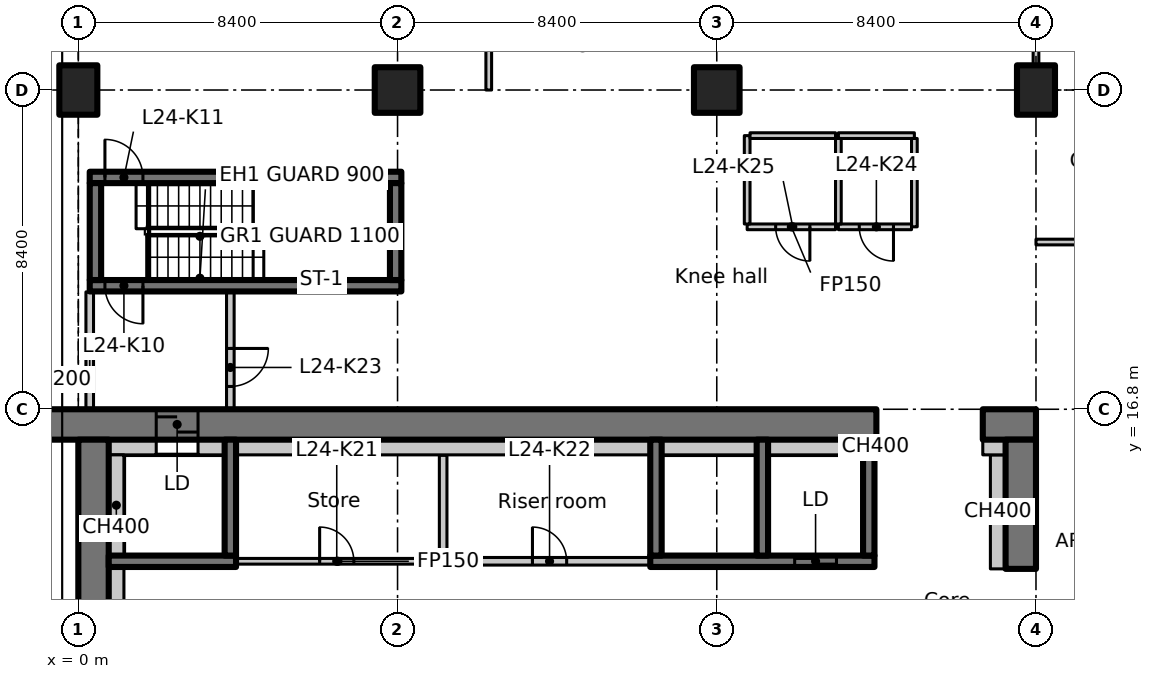
"""IFC4 building model, lengths in metres.
Left out: names, types, materials, properties, quantities, classifications, styles, units other than length and angle.
Written with IfcOpenShell. Run it as: python <this file> out.ifc"""

import sys

from ifc_helpers import new_model, si_unit, direction, frame, frame_2d, origin, origin_2d, place, context, subcontext, project, spatial, polyline, rectangle, outline, extrude, element, fill, save


model = new_model("IFC4")
c1 = context("Model", 3, precision=1e-05, world=origin(), true_north=direction((0.0, 1.0)))
c2 = subcontext(c1, "Body", "Model", "MODEL_VIEW")
j1 = project(units=[si_unit("LENGTHUNIT", "METRE"), si_unit("PLANEANGLEUNIT", "RADIAN")], contexts=[c1])
p1 = place(None, origin())
s1 = spatial("IfcSite", under=j1, at=p1, CompositionType="ELEMENT")
p2 = place(p1, origin())
s2 = spatial("IfcBuilding", under=s1, at=p2, CompositionType="ELEMENT")
p3 = place(p2, frame((0.0, 0.0, 102.5)))
s3 = spatial("IfcBuildingStorey", under=s2, at=p3, CompositionType="ELEMENT", Elevation=102.5)
p4 = place(p3, frame((0.0, 25.2, 0.0), z_axis=(0.0, 0.0, 1.0), x_axis=(1.0, 0.0, 0.0)))
e1 = element("IfcColumn", 1, at=p4, inside=s3, PredefinedType="COLUMN", context=c2, shape_type="SweptSolid", body=[
    extrude(rectangle(XDim=1.0, YDim=1.3, at=origin_2d()), origin(), (0.0, 0.0, 1.0), 3.35),
])
for number, where, z_axis, x_axis in (
    (2, (8.4, 25.2, 0.0), (0.0, 0.0, 1.0), (1.0, 0.0, 0.0)),
    (3, (16.8, 25.2, 0.0), (0.0, 0.0, 1.0), (1.0, 0.0, 0.0)),
):
    element("IfcColumn", number, at=place(p3, frame(where, z_axis=z_axis, x_axis=x_axis)), inside=s3, PredefinedType="COLUMN", context=c2, shape_type="SweptSolid", body=[
        extrude(rectangle(XDim=1.2, YDim=1.2, at=origin_2d()), origin(), (0.0, 0.0, 1.0), 3.35),
    ])
p5 = place(p3, frame((25.2, 25.2, 0.0), z_axis=(0.0, 0.0, 1.0), x_axis=(1.0, 0.0, 0.0)))
e4 = element("IfcColumn", 4, at=p5, inside=s3, PredefinedType="COLUMN", context=c2, shape_type="SweptSolid", body=[
    extrude(rectangle(XDim=1.0, YDim=1.3, at=origin_2d()), origin(), (0.0, 0.0, 1.0), 3.35),
])
p6 = place(p3, frame((-1.1, 16.4, 0.0), z_axis=(0.0, 0.0, 1.0), x_axis=(1.0, 0.0, 0.0)))
e5 = element("IfcWall", 5, at=p6, inside=s3, PredefinedType="SHEAR", context=c2, shape_type="SweptSolid", body=[
    extrude(rectangle(XDim=22.1, YDim=0.8, at=frame_2d((11.05, 0.0))), origin(), (0.0, 0.0, 1.0), 3.35),
])
p7 = place(p6, frame((3.15, 0.0, 0.0)))
e6 = element("IfcOpeningElement", 6, at=p7, cuts=e5, PredefinedType="OPENING", context=c2, shape_type="SweptSolid", body=[
    extrude(rectangle(XDim=1.1, YDim=2.3, at=frame_2d((0.55, 1.15))), frame((0.0, 0.41, 0.0), z_axis=(0.0, -1.0, 0.0), x_axis=(1.0, 0.0, 0.0)), (0.0, 0.0, 1.0), 0.82),
])
p8 = place(p3, frame((23.8, 16.4, 0.0), z_axis=(0.0, 0.0, 1.0), x_axis=(1.0, 0.0, 0.0)))
e7 = element("IfcWall", 7, at=p8, inside=s3, PredefinedType="SHEAR", context=c2, shape_type="SweptSolid", body=[
    extrude(rectangle(XDim=1.4, YDim=0.8, at=frame_2d((0.7, 0.0))), origin(), (0.0, 0.0, 1.0), 3.35),
])
p9 = place(p3, frame((0.4, 7.136, 0.0), z_axis=(0.0, 0.0, 1.0), x_axis=(0.0, 1.0, 0.0)))
e8 = element("IfcWall", 8, at=p9, inside=s3, PredefinedType="SHEAR", context=c2, shape_type="SweptSolid", body=[
    extrude(rectangle(XDim=8.864, YDim=0.8, at=frame_2d((4.432, 0.0))), origin(), (0.0, 0.0, 1.0), 3.35),
])
p10 = place(p3, frame((24.8, 12.6, 0.0), z_axis=(0.0, 0.0, 1.0), x_axis=(0.0, 1.0, 0.0)))
e9 = element("IfcWall", 9, at=p10, inside=s3, PredefinedType="SHEAR", context=c2, shape_type="SweptSolid", body=[
    extrude(rectangle(XDim=3.4, YDim=0.8, at=frame_2d((1.7, 0.0))), origin(), (0.0, 0.0, 1.0), 3.35),
])
p11 = place(p3, frame((24.2, 12.6, 0.0), z_axis=(0.0, 0.0, 1.0), x_axis=(0.0, 1.0, 0.0)))
e10 = element("IfcWall", 10, at=p11, inside=s3, PredefinedType="PARTITIONING", context=c2, shape_type="SweptSolid", body=[
    extrude(rectangle(XDim=3.0, YDim=0.4, at=frame_2d((1.5, 0.0))), origin(), (0.0, 0.0, 1.0), 3.35),
])
p12 = place(p3, frame((0.8, 15.8, 0.0), z_axis=(0.0, 0.0, 1.0), x_axis=(1.0, 0.0, 0.0)))
e11 = element("IfcWall", 11, at=p12, inside=s3, PredefinedType="PARTITIONING", context=c2, shape_type="SweptSolid", body=[
    extrude(rectangle(XDim=1.25, YDim=0.4, at=frame_2d((0.625, 0.0))), origin(), (0.0, 0.0, 1.0), 3.35),
])
p13 = place(p3, frame((23.8, 15.8, 0.0), z_axis=(0.0, 0.0, 1.0), x_axis=(1.0, 0.0, 0.0)))
e12 = element("IfcWall", 12, at=p13, inside=s3, PredefinedType="PARTITIONING", context=c2, shape_type="SweptSolid", body=[
    extrude(rectangle(XDim=0.6, YDim=0.4, at=frame_2d((0.3, 0.0))), origin(), (0.0, 0.0, 1.0), 3.35),
])
p14 = place(p3, frame((0.8, 12.8, 0.0), z_axis=(0.0, 0.0, 1.0), x_axis=(1.0, 0.0, 0.0)))
e13 = element("IfcWall", 13, at=p14, inside=s3, PredefinedType="SHEAR", context=c2, shape_type="SweptSolid", body=[
    extrude(rectangle(XDim=3.35, YDim=0.3, at=frame_2d((1.675, 0.0))), origin(), (0.0, 0.0, 1.0), 3.35),
])
p15 = place(p3, frame((4.0, 12.95, 0.0), z_axis=(0.0, 0.0, 1.0), x_axis=(0.0, 1.0, 0.0)))
e14 = element("IfcWall", 14, at=p15, inside=s3, PredefinedType="SHEAR", context=c2, shape_type="SweptSolid", body=[
    extrude(rectangle(XDim=3.05, YDim=0.3, at=frame_2d((1.525, 0.0))), origin(), (0.0, 0.0, 1.0), 3.35),
])
p16 = place(p3, frame((15.05, 12.8, 0.0), z_axis=(0.0, 0.0, 1.0), x_axis=(1.0, 0.0, 0.0)))
e15 = element("IfcWall", 15, at=p16, inside=s3, PredefinedType="SHEAR", context=c2, shape_type="SweptSolid", body=[
    extrude(rectangle(XDim=5.9, YDim=0.3, at=frame_2d((2.95, 0.0))), origin(), (0.0, 0.0, 1.0), 3.35),
])
p17 = place(p16, frame((3.8, 0.0, 0.0)))
e16 = element("IfcOpeningElement", 16, at=p17, cuts=e15, PredefinedType="OPENING", context=c2, shape_type="SweptSolid", body=[
    extrude(rectangle(XDim=1.1, YDim=2.3, at=frame_2d((0.55, 1.15))), frame((0.0, 0.16, 0.0), z_axis=(0.0, -1.0, 0.0), x_axis=(1.0, 0.0, 0.0)), (0.0, 0.0, 1.0), 0.32),
])
for number, where, z_axis, x_axis in (
    (17, (15.2, 12.95, 0.0), (0.0, 0.0, 1.0), (0.0, 1.0, 0.0)),
    (18, (18.0, 12.95, 0.0), (0.0, 0.0, 1.0), (0.0, 1.0, 0.0)),
    (19, (20.8, 12.95, 0.0), (0.0, 0.0, 1.0), (0.0, 1.0, 0.0)),
):
    element("IfcWall", number, at=place(p3, frame(where, z_axis=z_axis, x_axis=x_axis)), inside=s3, PredefinedType="SHEAR", context=c2, shape_type="SweptSolid", body=[
        extrude(rectangle(XDim=3.05, YDim=0.3, at=frame_2d((1.525, 0.0))), origin(), (0.0, 0.0, 1.0), 3.35),
    ])
p18 = place(p3, frame((8.5, 20.05, 0.0), z_axis=(0.0, 0.0, 1.0), x_axis=(-1.0, 0.0, 0.0)))
e20 = element("IfcWall", 20, at=p18, inside=s3, PredefinedType="SHEAR", context=c2, shape_type="SweptSolid", body=[
    extrude(rectangle(XDim=8.2, YDim=0.3, at=frame_2d((4.1, 0.0))), origin(), (0.0, 0.0, 1.0), 3.35),
])
p19 = place(p18, frame((6.8, 0.0, 0.0)))
e21 = element("IfcOpeningElement", 21, at=p19, cuts=e20, PredefinedType="OPENING", context=c2, shape_type="SweptSolid", body=[
    extrude(rectangle(XDim=1.0, YDim=2.1, at=frame_2d((0.5, 1.05))), frame((0.0, 0.16, 0.0), z_axis=(0.0, -1.0, 0.0), x_axis=(1.0, 0.0, 0.0)), (0.0, 0.0, 1.0), 0.32),
])
p20 = place(p3, frame((0.3, 22.9, 0.0), z_axis=(0.0, 0.0, 1.0), x_axis=(1.0, 0.0, 0.0)))
e22 = element("IfcWall", 22, at=p20, inside=s3, PredefinedType="SHEAR", context=c2, shape_type="SweptSolid", body=[
    extrude(rectangle(XDim=8.2, YDim=0.3, at=frame_2d((4.1, 0.0))), origin(), (0.0, 0.0, 1.0), 3.35),
])
p21 = place(p20, frame((0.4, 0.0, 0.0)))
e23 = element("IfcOpeningElement", 23, at=p21, cuts=e22, PredefinedType="OPENING", context=c2, shape_type="SweptSolid", body=[
    extrude(rectangle(XDim=1.0, YDim=2.1, at=frame_2d((0.5, 1.05))), frame((0.0, 0.16, 0.0), z_axis=(0.0, -1.0, 0.0), x_axis=(1.0, 0.0, 0.0)), (0.0, 0.0, 1.0), 0.32),
])
for number, where, z_axis, x_axis in (
    (24, (0.45, 20.2, 0.0), (0.0, 0.0, 1.0), (0.0, 1.0, 0.0)),
    (25, (8.35, 20.2, 0.0), (0.0, 0.0, 1.0), (0.0, 1.0, 0.0)),
):
    element("IfcWall", number, at=place(p3, frame(where, z_axis=z_axis, x_axis=x_axis)), inside=s3, PredefinedType="SHEAR", context=c2, shape_type="SweptSolid", body=[
        extrude(rectangle(XDim=2.55, YDim=0.3, at=frame_2d((1.275, 0.0))), origin(), (0.0, 0.0, 1.0), 3.35),
    ])
p22 = place(p3, frame((0.3, 16.812, 0.0), z_axis=(0.0, 0.0, 1.0), x_axis=(0.0, 1.0, 0.0)))
e26 = element("IfcWall", 26, at=p22, inside=s3, PredefinedType="PARTITIONING", context=c2, shape_type="SweptSolid", body=[
    extrude(rectangle(XDim=3.076, YDim=0.2, at=frame_2d((1.538, 0.0))), origin(), (0.0, 0.0, 1.0), 2.98),
])
p23 = place(p3, frame((4.0, 19.888, 0.0), z_axis=(0.0, 0.0, 1.0), x_axis=(0.0, -1.0, 0.0)))
e27 = element("IfcWall", 27, at=p23, inside=s3, PredefinedType="PARTITIONING", context=c2, shape_type="SweptSolid", body=[
    extrude(rectangle(XDim=3.076, YDim=0.2, at=frame_2d((1.538, 0.0))), origin(), (0.0, 0.0, 1.0), 3.35),
])
p24 = place(p23, frame((1.488, 0.0, 0.0)))
e28 = element("IfcOpeningElement", 28, at=p24, cuts=e27, PredefinedType="OPENING", context=c2, shape_type="SweptSolid", body=[
    extrude(rectangle(XDim=1.0, YDim=2.1, at=frame_2d((0.5, 1.05))), frame((0.0, 0.11, 0.0), z_axis=(0.0, -1.0, 0.0), x_axis=(1.0, 0.0, 0.0)), (0.0, 0.0, 1.0), 0.22),
])
p25 = place(p3, frame((9.6, 15.588, 0.0), z_axis=(0.0, 0.0, 1.0), x_axis=(0.0, -1.0, 0.0)))
e29 = element("IfcWall", 29, at=p25, inside=s3, PredefinedType="PARTITIONING", context=c2, shape_type="SweptSolid", body=[
    extrude(rectangle(XDim=2.788, YDim=0.2, at=frame_2d((1.394, 0.0))), origin(), (0.0, 0.0, 1.0), 3.35),
])
p26 = place(p3, frame((9.7, 12.8, 0.0), z_axis=(0.0, 0.0, 1.0), x_axis=(1.0, 0.0, 0.0)))
e30 = element("IfcWall", 30, at=p26, inside=s3, PredefinedType="PARTITIONING", context=c2, shape_type="SweptSolid", body=[
    extrude(rectangle(XDim=5.338, YDim=0.2, at=frame_2d((2.669, 0.0))), origin(), (0.0, 0.0, 1.0), 3.35),
])
p27 = place(p26, frame((2.25, 0.0, 0.0)))
e31 = element("IfcOpeningElement", 31, at=p27, cuts=e30, PredefinedType="OPENING", context=c2, shape_type="SweptSolid", body=[
    extrude(rectangle(XDim=0.9, YDim=2.1, at=frame_2d((0.45, 1.05))), frame((0.0, 0.11, 0.0), z_axis=(0.0, -1.0, 0.0), x_axis=(1.0, 0.0, 0.0)), (0.0, 0.0, 1.0), 0.22),
])
p28 = place(p3, frame((4.162, 12.8, 0.0), z_axis=(0.0, 0.0, 1.0), x_axis=(1.0, 0.0, 0.0)))
e32 = element("IfcWall", 32, at=p28, inside=s3, PredefinedType="PARTITIONING", context=c2, shape_type="SweptSolid", body=[
    extrude(rectangle(XDim=5.338, YDim=0.15, at=frame_2d((2.669, 0.0))), origin(), (0.0, 0.0, 1.0), 3.35),
])
p29 = place(p28, frame((2.188, 0.0, 0.0)))
e33 = element("IfcOpeningElement", 33, at=p29, cuts=e32, PredefinedType="OPENING", context=c2, shape_type="SweptSolid", body=[
    extrude(rectangle(XDim=0.9, YDim=2.1, at=frame_2d((0.45, 1.05))), frame((0.0, 0.085, 0.0), z_axis=(0.0, -1.0, 0.0), x_axis=(1.0, 0.0, 0.0)), (0.0, 0.0, 1.0), 0.17),
])
p30 = place(p3, frame((20.0, 24.0, 0.0), z_axis=(0.0, 0.0, 1.0), x_axis=(1.0, 0.0, 0.0)))
e34 = element("IfcWall", 34, at=p30, inside=s3, PredefinedType="PARTITIONING", context=c2, shape_type="SweptSolid", body=[
    extrude(rectangle(XDim=2.0, YDim=0.15, at=frame_2d((1.0, 0.0))), origin(), (0.0, 0.0, 1.0), 3.35),
])
p31 = place(p3, frame((22.0, 23.925, 0.0), z_axis=(0.0, 0.0, 1.0), x_axis=(0.0, -1.0, 0.0)))
e35 = element("IfcWall", 35, at=p31, inside=s3, PredefinedType="PARTITIONING", context=c2, shape_type="SweptSolid", body=[
    extrude(rectangle(XDim=2.325, YDim=0.15, at=frame_2d((1.163, 0.0))), origin(), (0.0, 0.0, 1.0), 3.35),
])
p32 = place(p3, frame((21.925, 21.6, 0.0), z_axis=(0.0, 0.0, 1.0), x_axis=(-1.0, 0.0, 0.0)))
e36 = element("IfcWall", 36, at=p32, inside=s3, PredefinedType="PARTITIONING", context=c2, shape_type="SweptSolid", body=[
    extrude(rectangle(XDim=1.925, YDim=0.15, at=frame_2d((0.962, 0.0))), origin(), (0.0, 0.0, 1.0), 3.35),
])
p33 = place(p32, frame((0.475, 0.0, 0.0)))
e37 = element("IfcOpeningElement", 37, at=p33, cuts=e36, PredefinedType="OPENING", context=c2, shape_type="SweptSolid", body=[
    extrude(rectangle(XDim=0.9, YDim=2.1, at=frame_2d((0.45, 1.05))), frame((0.0, 0.085, 0.0), z_axis=(0.0, -1.0, 0.0), x_axis=(1.0, 0.0, 0.0)), (0.0, 0.0, 1.0), 0.17),
])
p34 = place(p3, frame((20.0, 21.675, 0.0), z_axis=(0.0, 0.0, 1.0), x_axis=(0.0, 1.0, 0.0)))
e38 = element("IfcWall", 38, at=p34, inside=s3, PredefinedType="PARTITIONING", context=c2, shape_type="SweptSolid", body=[
    extrude(rectangle(XDim=2.25, YDim=0.15, at=frame_2d((1.125, 0.0))), origin(), (0.0, 0.0, 1.0), 3.35),
])
p35 = place(p3, frame((19.925, 21.6, 0.0), z_axis=(0.0, 0.0, 1.0), x_axis=(-1.0, 0.0, 0.0)))
e39 = element("IfcWall", 39, at=p35, inside=s3, PredefinedType="PARTITIONING", context=c2, shape_type="SweptSolid", body=[
    extrude(rectangle(XDim=2.325, YDim=0.15, at=frame_2d((1.163, 0.0))), origin(), (0.0, 0.0, 1.0), 3.35),
])
p36 = place(p35, frame((0.675, 0.0, 0.0)))
e40 = element("IfcOpeningElement", 40, at=p36, cuts=e39, PredefinedType="OPENING", context=c2, shape_type="SweptSolid", body=[
    extrude(rectangle(XDim=0.9, YDim=2.1, at=frame_2d((0.45, 1.05))), frame((0.0, 0.085, 0.0), z_axis=(0.0, -1.0, 0.0), x_axis=(1.0, 0.0, 0.0)), (0.0, 0.0, 1.0), 0.17),
])
p37 = place(p3, frame((17.6, 21.675, 0.0), z_axis=(0.0, 0.0, 1.0), x_axis=(0.0, 1.0, 0.0)))
e41 = element("IfcWall", 41, at=p37, inside=s3, PredefinedType="PARTITIONING", context=c2, shape_type="SweptSolid", body=[
    extrude(rectangle(XDim=2.325, YDim=0.15, at=frame_2d((1.163, 0.0))), origin(), (0.0, 0.0, 1.0), 3.35),
])
p38 = place(p3, frame((17.675, 24.0, 0.0), z_axis=(0.0, 0.0, 1.0), x_axis=(1.0, 0.0, 0.0)))
e42 = element("IfcWall", 42, at=p38, inside=s3, PredefinedType="PARTITIONING", context=c2, shape_type="SweptSolid", body=[
    extrude(rectangle(XDim=2.25, YDim=0.15, at=frame_2d((1.125, 0.0))), origin(), (0.0, 0.0, 1.0), 3.35),
])
p39 = place(p3, frame((1.0, 9.75, 0.0), z_axis=(0.0, 0.0, 1.0), x_axis=(0.0, 1.0, 0.0)))
e43 = element("IfcWall", 43, at=p39, inside=s3, PredefinedType="PARTITIONING", context=c2, shape_type="SweptSolid", body=[
    extrude(rectangle(XDim=2.9, YDim=0.4, at=frame_2d((1.45, 0.0))), origin(), (0.0, 0.0, 1.0), 3.35),
])
p40 = place(p3, frame((1.0, 12.95, 0.0), z_axis=(0.0, 0.0, 1.0), x_axis=(0.0, 1.0, 0.0)))
e44 = element("IfcWall", 44, at=p40, inside=s3, PredefinedType="PARTITIONING", context=c2, shape_type="SweptSolid", body=[
    extrude(rectangle(XDim=2.65, YDim=0.4, at=frame_2d((1.325, 0.0))), origin(), (0.0, 0.0, 1.0), 3.35),
])
p41 = place(p3, frame((3.15, 15.8, 0.0), z_axis=(0.0, 0.0, 1.0), x_axis=(1.0, 0.0, 0.0)))
e45 = element("IfcWall", 45, at=p41, inside=s3, PredefinedType="PARTITIONING", context=c2, shape_type="SweptSolid", body=[
    extrude(rectangle(XDim=0.7, YDim=0.4, at=frame_2d((0.35, 0.0))), origin(), (0.0, 0.0, 1.0), 3.35),
])
p42 = place(p3, frame((4.15, 15.8, 0.0), z_axis=(0.0, 0.0, 1.0), x_axis=(1.0, 0.0, 0.0)))
e46 = element("IfcWall", 46, at=p42, inside=s3, PredefinedType="PARTITIONING", context=c2, shape_type="SweptSolid", body=[
    extrude(rectangle(XDim=10.9, YDim=0.4, at=frame_2d((5.45, 0.0))), origin(), (0.0, 0.0, 1.0), 3.35),
])
for number, where, z_axis, x_axis in (
    (47, (15.35, 15.8, 0.0), (0.0, 0.0, 1.0), (1.0, 0.0, 0.0)),
    (48, (18.15, 15.8, 0.0), (0.0, 0.0, 1.0), (1.0, 0.0, 0.0)),
):
    element("IfcWall", number, at=place(p3, frame(where, z_axis=z_axis, x_axis=x_axis)), inside=s3, PredefinedType="PARTITIONING", context=c2, shape_type="SweptSolid", body=[
        extrude(rectangle(XDim=2.5, YDim=0.4, at=frame_2d((1.25, 0.0))), origin(), (0.0, 0.0, 1.0), 3.35),
    ])
p43 = place(p3, frame((20.95, 15.8, 0.0), z_axis=(0.0, 0.0, 1.0), x_axis=(1.0, 0.0, 0.0)))
e49 = element("IfcWall", 49, at=p43, inside=s3, PredefinedType="PARTITIONING", context=c2, shape_type="SweptSolid", body=[
    extrude(rectangle(XDim=0.05, YDim=0.4, at=frame_2d((0.025, 0.0))), origin(), (0.0, 0.0, 1.0), 3.35),
])
p44 = place(p3, frame((25.2, 21.2, 0.0), z_axis=(0.0, 0.0, 1.0), x_axis=(1.0, 0.0, 0.0)))
e50 = element("IfcWall", 50, at=p44, inside=s3, PredefinedType="PARTITIONING", context=c2, shape_type="SweptSolid", body=[
    extrude(rectangle(XDim=4.2, YDim=0.15, at=frame_2d((2.1, 0.0))), origin(), (0.0, 0.0, 1.0), 3.33),
])
p45 = place(p3, frame((25.2, 31.0, 0.0), z_axis=(0.0, 0.0, 1.0), x_axis=(0.0, -1.0, 0.0)))
e51 = element("IfcWall", 51, at=p45, inside=s3, PredefinedType="PARTITIONING", context=c2, shape_type="SweptSolid", body=[
    extrude(outline(polyline([(0.0, 0.0), (5.13, 0.0), (5.13, 2.98), (0.0, 2.98), (0.0, 0.0)])), frame((0.0, 0.075, 0.0), z_axis=(0.0, -1.0, 0.0), x_axis=(1.0, 0.0, 0.0)), (0.0, 0.0, 1.0), 0.15),
])
p46 = place(p45, frame((1.93, 0.0, 0.0)))
e52 = element("IfcOpeningElement", 52, at=p46, cuts=e51, PredefinedType="OPENING", context=c2, shape_type="SweptSolid", body=[
    extrude(rectangle(XDim=1.1, YDim=2.1, at=frame_2d((0.55, 1.05))), frame((0.0, 0.085, 0.0), z_axis=(0.0, -1.0, 0.0), x_axis=(1.0, 0.0, 0.0)), (0.0, 0.0, 1.0), 0.17),
])
p47 = place(p3, frame((10.8, 25.2, 0.0), z_axis=(0.0, 0.0, 1.0), x_axis=(0.0, 1.0, 0.0)))
e53 = element("IfcWall", 53, at=p47, inside=s3, PredefinedType="PARTITIONING", context=c2, shape_type="SweptSolid", body=[
    extrude(rectangle(XDim=8.4, YDim=0.15, at=frame_2d((4.2, 0.0))), origin(), (0.0, 0.0, 1.0), 3.33),
])
p48 = place(p47, frame((3.3, 0.0, 0.0)))
e54 = element("IfcOpeningElement", 54, at=p48, cuts=e53, PredefinedType="OPENING", context=c2, shape_type="SweptSolid", body=[
    extrude(rectangle(XDim=1.6, YDim=2.1, at=frame_2d((0.8, 1.05))), frame((0.0, 0.085, 0.0), z_axis=(0.0, -1.0, 0.0), x_axis=(1.0, 0.0, 0.0)), (0.0, 0.0, 1.0), 0.17),
])
p49 = place(p7, origin())
e55 = element("IfcDoor", 55, at=p49, inside=s3, OperationType="SLIDING_TO_LEFT", PredefinedType="DOOR", context=c2, shape_type="SweptSolid", body=[
    extrude(rectangle(XDim=1.1, YDim=2.3, at=frame_2d((0.55, 1.15))), frame((0.0, 0.025, 0.0), z_axis=(0.0, -1.0, 0.0), x_axis=(1.0, 0.0, 0.0)), (0.0, 0.0, 1.0), 0.05),
])
fill(e6, e55)
p50 = place(p17, origin())
e56 = element("IfcDoor", 56, at=p50, inside=s3, OperationType="SLIDING_TO_LEFT", PredefinedType="DOOR", context=c2, shape_type="SweptSolid", body=[
    extrude(rectangle(XDim=1.1, YDim=2.3, at=frame_2d((0.55, 1.15))), frame((0.0, 0.025, 0.0), z_axis=(0.0, -1.0, 0.0), x_axis=(1.0, 0.0, 0.0)), (0.0, 0.0, 1.0), 0.05),
])
fill(e16, e56)
p51 = place(p19, origin())
e57 = element("IfcDoor", 57, at=p51, inside=s3, OperationType="SINGLE_SWING_RIGHT", PredefinedType="DOOR", context=c2, shape_type="SweptSolid", body=[
    extrude(rectangle(XDim=1.0, YDim=2.1, at=frame_2d((0.5, 1.05))), frame((0.0, 0.025, 0.0), z_axis=(0.0, -1.0, 0.0), x_axis=(1.0, 0.0, 0.0)), (0.0, 0.0, 1.0), 0.05),
])
fill(e21, e57)
p52 = place(p21, origin())
e58 = element("IfcDoor", 58, at=p52, inside=s3, OperationType="SINGLE_SWING_LEFT", PredefinedType="DOOR", context=c2, shape_type="SweptSolid", body=[
    extrude(rectangle(XDim=1.0, YDim=2.1, at=frame_2d((0.5, 1.05))), frame((0.0, 0.025, 0.0), z_axis=(0.0, -1.0, 0.0), x_axis=(1.0, 0.0, 0.0)), (0.0, 0.0, 1.0), 0.05),
])
fill(e23, e58)
p53 = place(p29, origin())
e59 = element("IfcDoor", 59, at=p53, inside=s3, OperationType="SINGLE_SWING_LEFT", PredefinedType="DOOR", context=c2, shape_type="SweptSolid", body=[
    extrude(rectangle(XDim=0.9, YDim=2.1, at=frame_2d((0.45, 1.05))), frame((0.0, 0.025, 0.0), z_axis=(0.0, -1.0, 0.0), x_axis=(1.0, 0.0, 0.0)), (0.0, 0.0, 1.0), 0.05),
])
fill(e33, e59)
p54 = place(p27, origin())
e60 = element("IfcDoor", 60, at=p54, inside=s3, OperationType="SINGLE_SWING_RIGHT", PredefinedType="DOOR", context=c2, shape_type="SweptSolid", body=[
    extrude(rectangle(XDim=0.9, YDim=2.1, at=frame_2d((0.45, 1.05))), frame((0.0, 0.025, 0.0), z_axis=(0.0, -1.0, 0.0), x_axis=(1.0, 0.0, 0.0)), (0.0, 0.0, 1.0), 0.05),
])
fill(e31, e60)
p55 = place(p24, origin())
e61 = element("IfcDoor", 61, at=p55, inside=s3, OperationType="SINGLE_SWING_LEFT", PredefinedType="DOOR", context=c2, shape_type="SweptSolid", body=[
    extrude(rectangle(XDim=1.0, YDim=2.1, at=frame_2d((0.5, 1.05))), frame((0.0, 0.025, 0.0), z_axis=(0.0, -1.0, 0.0), x_axis=(1.0, 0.0, 0.0)), (0.0, 0.0, 1.0), 0.05),
])
fill(e28, e61)
p56 = place(p33, origin())
e62 = element("IfcDoor", 62, at=p56, inside=s3, OperationType="SINGLE_SWING_RIGHT", PredefinedType="DOOR", context=c2, shape_type="SweptSolid", body=[
    extrude(rectangle(XDim=0.9, YDim=2.1, at=frame_2d((0.45, 1.05))), frame((0.0, 0.025, 0.0), z_axis=(0.0, -1.0, 0.0), x_axis=(1.0, 0.0, 0.0)), (0.0, 0.0, 1.0), 0.05),
])
fill(e37, e62)
p57 = place(p36, origin())
e63 = element("IfcDoor", 63, at=p57, inside=s3, OperationType="SINGLE_SWING_LEFT", PredefinedType="DOOR", context=c2, shape_type="SweptSolid", body=[
    extrude(rectangle(XDim=0.9, YDim=2.1, at=frame_2d((0.45, 1.05))), frame((0.0, 0.025, 0.0), z_axis=(0.0, -1.0, 0.0), x_axis=(1.0, 0.0, 0.0)), (0.0, 0.0, 1.0), 0.05),
])
fill(e40, e63)
save(model, sys.argv[1])
